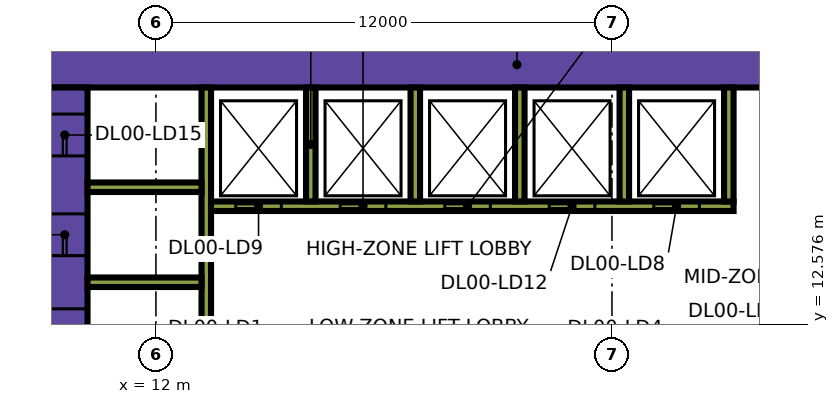
"""IFC4 building model, lengths in metres.
Left out: names, types, materials, properties, quantities, classifications, styles, units other than length and angle.
Written with IfcOpenShell. Run it as: python <this file> out.ifc"""

import sys

from ifc_helpers import new_model, si_unit, direction, frame, frame_2d, origin, place, context, subcontext, project, spatial, rectangle, extrude, element, fill, save


model = new_model("IFC4")
c1 = context("Model", 3, precision=1e-05, world=origin(), true_north=direction((0.0, 1.0)))
c2 = subcontext(c1, "Body", "Model", "MODEL_VIEW")
j1 = project(units=[si_unit("LENGTHUNIT", "METRE"), si_unit("PLANEANGLEUNIT", "RADIAN")], contexts=[c1])
p1 = place(None, origin())
s1 = spatial("IfcSite", under=j1, at=p1, CompositionType="ELEMENT")
p2 = place(p1, origin())
s2 = spatial("IfcBuilding", under=s1, at=p2, CompositionType="ELEMENT")
p3 = place(p2, origin())
s3 = spatial("IfcBuildingStorey", under=s2, at=p3, CompositionType="ELEMENT", Elevation=0.0)
p4 = place(p3, frame((9.0, 19.4, 0.0), z_axis=(0.0, 0.0, 1.0), x_axis=(1.0, 0.0, 0.0)))
e1 = element("IfcWall", 1, at=p4, inside=s3, PredefinedType="SHEAR", context=c2, shape_type="SweptSolid", body=[
    extrude(rectangle(XDim=25.0, YDim=1.2, at=frame_2d((12.5, 0.0))), origin(), (0.0, 0.0, 1.0), 7.2),
])
p5 = place(p4, frame((19.1, 0.0, 0.0)))
e2 = element("IfcOpeningElement", 2, at=p5, cuts=e1, PredefinedType="OPENING", context=c2, shape_type="SweptSolid", body=[
    extrude(rectangle(XDim=1.8, YDim=2.4, at=frame_2d((0.9, 1.2))), frame((0.0, 0.61, 0.0), z_axis=(0.0, -1.0, 0.0), x_axis=(1.0, 0.0, 0.0)), (0.0, 0.0, 1.0), 1.22),
])
p6 = place(p3, frame((9.6, 8.2, 0.0), z_axis=(0.0, 0.0, 1.0), x_axis=(0.0, 1.0, 0.0)))
e3 = element("IfcWall", 3, at=p6, inside=s3, PredefinedType="SHEAR", context=c2, shape_type="SweptSolid", body=[
    extrude(rectangle(XDim=10.6, YDim=1.2, at=frame_2d((5.3, 0.0))), origin(), (0.0, 0.0, 1.0), 7.2),
])
p7 = place(p6, frame((3.675, 0.0, 0.0)))
e4 = element("IfcOpeningElement", 4, at=p7, cuts=e3, PredefinedType="OPENING", context=c2, shape_type="SweptSolid", body=[
    extrude(rectangle(XDim=1.1, YDim=2.2, at=frame_2d((0.55, 1.1))), frame((0.0, 0.61, 0.0), z_axis=(0.0, -1.0, 0.0), x_axis=(1.0, 0.0, 0.0)), (0.0, 0.0, 1.0), 1.22),
])
p8 = place(p6, frame((6.175, 0.0, 0.0)))
e5 = element("IfcOpeningElement", 5, at=p8, cuts=e3, PredefinedType="OPENING", context=c2, shape_type="SweptSolid", body=[
    extrude(rectangle(XDim=1.1, YDim=2.2, at=frame_2d((0.55, 1.1))), frame((0.0, 0.61, 0.0), z_axis=(0.0, -1.0, 0.0), x_axis=(1.0, 0.0, 0.0)), (0.0, 0.0, 1.0), 1.22),
])
p9 = place(p6, frame((8.8, 0.0, 0.0)))
e6 = element("IfcOpeningElement", 6, at=p9, cuts=e3, PredefinedType="OPENING", context=c2, shape_type="SweptSolid", body=[
    extrude(rectangle(XDim=1.1, YDim=2.2, at=frame_2d((0.55, 1.1))), frame((0.0, 0.61, 0.0), z_axis=(0.0, -1.0, 0.0), x_axis=(1.0, 0.0, 0.0)), (0.0, 0.0, 1.0), 1.22),
])
p10 = place(p6, frame((1.35, 0.0, 0.0)))
e7 = element("IfcOpeningElement", 7, at=p10, cuts=e3, PredefinedType="OPENING", context=c2, shape_type="SweptSolid", body=[
    extrude(rectangle(XDim=0.9, YDim=2.1, at=frame_2d((0.45, 1.05))), frame((0.0, 0.61, 0.0), z_axis=(0.0, -1.0, 0.0), x_axis=(1.0, 0.0, 0.0)), (0.0, 0.0, 1.0), 1.22),
])
p11 = place(p3, frame((13.325, 8.2, 0.0), z_axis=(0.0, 0.0, 1.0), x_axis=(0.0, 1.0, 0.0)))
e8 = element("IfcWall", 8, at=p11, inside=s3, PredefinedType="SHEAR", context=c2, shape_type="SweptSolid", body=[
    extrude(rectangle(XDim=10.6, YDim=0.25, at=frame_2d((5.3, 0.0))), origin(), (0.0, 0.0, 1.0), 7.2),
])
p12 = place(p3, frame((13.45, 15.675, 0.0), z_axis=(0.0, 0.0, 1.0), x_axis=(1.0, 0.0, 0.0)))
e9 = element("IfcWall", 9, at=p12, inside=s3, PredefinedType="SHEAR", context=c2, shape_type="SweptSolid", body=[
    extrude(rectangle(XDim=13.75, YDim=0.25, at=frame_2d((6.875, 0.0))), origin(), (0.0, 0.0, 1.0), 7.2),
])
p13 = place(p12, frame((11.65, 0.0, 0.0)))
e10 = element("IfcOpeningElement", 10, at=p13, cuts=e9, PredefinedType="OPENING", context=c2, shape_type="SweptSolid", body=[
    extrude(rectangle(XDim=1.2, YDim=2.2, at=frame_2d((0.6, 1.1))), frame((0.0, 0.135, 0.0), z_axis=(0.0, -1.0, 0.0), x_axis=(1.0, 0.0, 0.0)), (0.0, 0.0, 1.0), 0.27),
])
p14 = place(p12, frame((0.65, 0.0, 0.0)))
e11 = element("IfcOpeningElement", 11, at=p14, cuts=e9, PredefinedType="OPENING", context=c2, shape_type="SweptSolid", body=[
    extrude(rectangle(XDim=1.2, YDim=2.2, at=frame_2d((0.6, 1.1))), frame((0.0, 0.135, 0.0), z_axis=(0.0, -1.0, 0.0), x_axis=(1.0, 0.0, 0.0)), (0.0, 0.0, 1.0), 0.27),
])
p15 = place(p12, frame((3.4, 0.0, 0.0)))
e12 = element("IfcOpeningElement", 12, at=p15, cuts=e9, PredefinedType="OPENING", context=c2, shape_type="SweptSolid", body=[
    extrude(rectangle(XDim=1.2, YDim=2.2, at=frame_2d((0.6, 1.1))), frame((0.0, 0.135, 0.0), z_axis=(0.0, -1.0, 0.0), x_axis=(1.0, 0.0, 0.0)), (0.0, 0.0, 1.0), 0.27),
])
p16 = place(p12, frame((6.15, 0.0, 0.0)))
e13 = element("IfcOpeningElement", 13, at=p16, cuts=e9, PredefinedType="OPENING", context=c2, shape_type="SweptSolid", body=[
    extrude(rectangle(XDim=1.2, YDim=2.2, at=frame_2d((0.6, 1.1))), frame((0.0, 0.135, 0.0), z_axis=(0.0, -1.0, 0.0), x_axis=(1.0, 0.0, 0.0)), (0.0, 0.0, 1.0), 0.27),
])
p17 = place(p12, frame((8.9, 0.0, 0.0)))
e14 = element("IfcOpeningElement", 14, at=p17, cuts=e9, PredefinedType="OPENING", context=c2, shape_type="SweptSolid", body=[
    extrude(rectangle(XDim=1.2, YDim=2.2, at=frame_2d((0.6, 1.1))), frame((0.0, 0.135, 0.0), z_axis=(0.0, -1.0, 0.0), x_axis=(1.0, 0.0, 0.0)), (0.0, 0.0, 1.0), 0.27),
])
for number, where, z_axis, x_axis in (
    (15, (10.2, 13.675, 0.0), (0.0, 0.0, 1.0), (1.0, 0.0, 0.0)),
    (16, (10.2, 16.175, 0.0), (0.0, 0.0, 1.0), (1.0, 0.0, 0.0)),
    (17, (16.075, 15.8, 0.0), (0.0, 0.0, 1.0), (0.0, 1.0, 0.0)),
    (18, (18.825, 15.8, 0.0), (0.0, 0.0, 1.0), (0.0, 1.0, 0.0)),
    (19, (21.575, 15.8, 0.0), (0.0, 0.0, 1.0), (0.0, 1.0, 0.0)),
    (20, (24.325, 15.8, 0.0), (0.0, 0.0, 1.0), (0.0, 1.0, 0.0)),
    (21, (27.075, 15.8, 0.0), (0.0, 0.0, 1.0), (0.0, 1.0, 0.0)),
):
    element("IfcWall", number, at=place(p3, frame(where, z_axis=z_axis, x_axis=x_axis)), inside=s3, PredefinedType="SHEAR", context=c2, shape_type="SweptSolid", body=[
        extrude(rectangle(XDim=3.0, YDim=0.25, at=frame_2d((1.5, 0.0))), origin(), (0.0, 0.0, 1.0), 7.2),
    ])
p18 = place(p13, origin())
e22 = element("IfcDoor", 22, at=p18, inside=s3, OperationType="DOUBLE_DOOR_SLIDING", PredefinedType="DOOR", context=c2, shape_type="SweptSolid", body=[
    extrude(rectangle(XDim=1.2, YDim=2.2, at=frame_2d((0.6, 1.1))), frame((0.0, 0.025, 0.0), z_axis=(0.0, -1.0, 0.0), x_axis=(1.0, 0.0, 0.0)), (0.0, 0.0, 1.0), 0.05),
])
fill(e10, e22)
p19 = place(p14, origin())
e23 = element("IfcDoor", 23, at=p19, inside=s3, OperationType="DOUBLE_DOOR_SLIDING", PredefinedType="DOOR", context=c2, shape_type="SweptSolid", body=[
    extrude(rectangle(XDim=1.2, YDim=2.2, at=frame_2d((0.6, 1.1))), frame((0.0, 0.025, 0.0), z_axis=(0.0, -1.0, 0.0), x_axis=(1.0, 0.0, 0.0)), (0.0, 0.0, 1.0), 0.05),
])
fill(e11, e23)
p20 = place(p15, origin())
e24 = element("IfcDoor", 24, at=p20, inside=s3, OperationType="DOUBLE_DOOR_SLIDING", PredefinedType="DOOR", context=c2, shape_type="SweptSolid", body=[
    extrude(rectangle(XDim=1.2, YDim=2.2, at=frame_2d((0.6, 1.1))), frame((0.0, 0.025, 0.0), z_axis=(0.0, -1.0, 0.0), x_axis=(1.0, 0.0, 0.0)), (0.0, 0.0, 1.0), 0.05),
])
fill(e12, e24)
p21 = place(p16, origin())
e25 = element("IfcDoor", 25, at=p21, inside=s3, OperationType="DOUBLE_DOOR_SLIDING", PredefinedType="DOOR", context=c2, shape_type="SweptSolid", body=[
    extrude(rectangle(XDim=1.2, YDim=2.2, at=frame_2d((0.6, 1.1))), frame((0.0, 0.025, 0.0), z_axis=(0.0, -1.0, 0.0), x_axis=(1.0, 0.0, 0.0)), (0.0, 0.0, 1.0), 0.05),
])
fill(e13, e25)
p22 = place(p17, origin())
e26 = element("IfcDoor", 26, at=p22, inside=s3, OperationType="DOUBLE_DOOR_SLIDING", PredefinedType="DOOR", context=c2, shape_type="SweptSolid", body=[
    extrude(rectangle(XDim=1.2, YDim=2.2, at=frame_2d((0.6, 1.1))), frame((0.0, 0.025, 0.0), z_axis=(0.0, -1.0, 0.0), x_axis=(1.0, 0.0, 0.0)), (0.0, 0.0, 1.0), 0.05),
])
fill(e14, e26)
p23 = place(p7, origin())
e27 = element("IfcDoor", 27, at=p23, inside=s3, OperationType="DOUBLE_DOOR_SLIDING", PredefinedType="DOOR", context=c2, shape_type="SweptSolid", body=[
    extrude(rectangle(XDim=1.1, YDim=2.2, at=frame_2d((0.55, 1.1))), frame((0.0, 0.025, 0.0), z_axis=(0.0, -1.0, 0.0), x_axis=(1.0, 0.0, 0.0)), (0.0, 0.0, 1.0), 0.05),
])
fill(e4, e27)
p24 = place(p8, origin())
e28 = element("IfcDoor", 28, at=p24, inside=s3, OperationType="DOUBLE_DOOR_SLIDING", PredefinedType="DOOR", context=c2, shape_type="SweptSolid", body=[
    extrude(rectangle(XDim=1.1, YDim=2.2, at=frame_2d((0.55, 1.1))), frame((0.0, 0.025, 0.0), z_axis=(0.0, -1.0, 0.0), x_axis=(1.0, 0.0, 0.0)), (0.0, 0.0, 1.0), 0.05),
])
fill(e5, e28)
p25 = place(p9, origin())
e29 = element("IfcDoor", 29, at=p25, inside=s3, OperationType="DOUBLE_DOOR_SLIDING", PredefinedType="DOOR", context=c2, shape_type="SweptSolid", body=[
    extrude(rectangle(XDim=1.1, YDim=2.2, at=frame_2d((0.55, 1.1))), frame((0.0, 0.025, 0.0), z_axis=(0.0, -1.0, 0.0), x_axis=(1.0, 0.0, 0.0)), (0.0, 0.0, 1.0), 0.05),
])
fill(e6, e29)
save(model, sys.argv[1])
